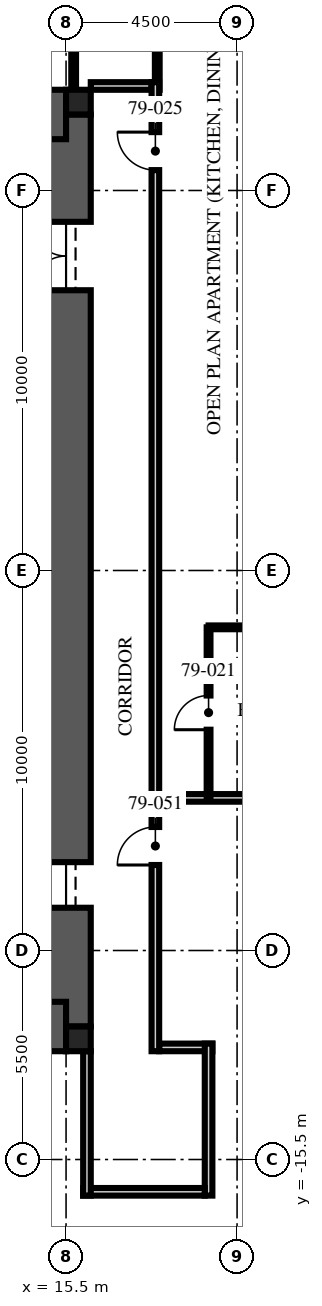
"""IFC4 building model, lengths in metres.
Left out: names, types, materials, properties, quantities, classifications, styles, units other than length and angle.
Written with IfcOpenShell. Run it as: python <this file> out.ifc"""

import sys

from ifc_helpers import new_model, si_unit, direction, frame, frame_2d, origin, origin_2d, place, context, subcontext, project, spatial, rectangle, extrude, element, fill, save


model = new_model("IFC4")
c1 = context("Model", 3, precision=1e-05, world=origin(), true_north=direction((0.0, 1.0)))
c2 = subcontext(c1, "Body", "Model", "MODEL_VIEW")
j1 = project(units=[si_unit("LENGTHUNIT", "METRE"), si_unit("PLANEANGLEUNIT", "RADIAN")], contexts=[c1])
p1 = place(None, origin())
s1 = spatial("IfcSite", under=j1, at=p1, CompositionType="ELEMENT")
p2 = place(p1, origin())
s2 = spatial("IfcBuilding", under=s1, at=p2, CompositionType="ELEMENT")
p3 = place(p2, frame((0.0, 0.0, 315.75)))
s3 = spatial("IfcBuildingStorey", under=s2, at=p3, CompositionType="ELEMENT", Elevation=315.75)
p4 = place(p3, frame((15.5, -12.0, -0.25), z_axis=(0.0, 0.0, 1.0), x_axis=(0.0, 1.0, 0.0)))
e1 = element("IfcWall", 1, at=p4, inside=s3, PredefinedType="SHEAR", context=c2, shape_type="SweptSolid", body=[
    extrude(rectangle(XDim=24.0, YDim=1.3, at=frame_2d((12.0, 0.0))), origin(), (0.0, 0.0, 1.0), 3.75),
])
p5 = place(p4, frame((3.125, 0.0, 0.25)))
e2 = element("IfcOpeningElement", 2, at=p5, cuts=e1, PredefinedType="OPENING", context=c2, shape_type="SweptSolid", body=[
    extrude(rectangle(XDim=1.2, YDim=2.1, at=frame_2d((0.6, 1.05))), frame((0.0, 0.66, 0.0), z_axis=(0.0, -1.0, 0.0), x_axis=(1.0, 0.0, 0.0)), (0.0, 0.0, 1.0), 1.32),
])
p6 = place(p4, frame((19.375, 0.0, 0.25)))
e3 = element("IfcOpeningElement", 3, at=p6, cuts=e1, PredefinedType="OPENING", context=c2, shape_type="SweptSolid", body=[
    extrude(rectangle(XDim=1.8, YDim=2.1, at=frame_2d((0.9, 1.05))), frame((0.0, 0.66, 0.0), z_axis=(0.0, -1.0, 0.0), x_axis=(1.0, 0.0, 0.0)), (0.0, 0.0, 1.0), 1.32),
])
for number, where, z_axis, x_axis in (
    (4, (-15.5, 12.0, -0.25), (0.0, 0.0, 1.0), (1.0, 0.0, 0.0)),
    (5, (-15.5, -12.0, -0.25), (0.0, 0.0, 1.0), (1.0, 0.0, 0.0)),
):
    element("IfcWall", number, at=place(p3, frame(where, z_axis=z_axis, x_axis=x_axis)), inside=s3, PredefinedType="SHEAR", context=c2, shape_type="SweptSolid", body=[
        extrude(rectangle(XDim=31.0, YDim=1.3, at=frame_2d((15.5, 0.0))), origin(), (0.0, 0.0, 1.0), 3.75),
    ])
for number, where, z_axis, x_axis in (
    (6, (15.825, 12.325, -0.25), (0.0, 0.0, 1.0), (1.0, 0.0, 0.0)),
    (7, (15.825, -12.325, -0.25), (0.0, 0.0, 1.0), (1.0, 0.0, 0.0)),
):
    element("IfcColumn", number, at=place(p3, frame(where, z_axis=z_axis, x_axis=x_axis)), inside=s3, PredefinedType="COLUMN", context=c2, shape_type="SweptSolid", body=[
        extrude(rectangle(XDim=0.65, YDim=0.65, at=origin_2d()), origin(), (0.0, 0.0, 1.0), 3.75),
    ])
p7 = place(p3, frame((17.95, -12.55, 0.0), z_axis=(0.0, 0.0, 1.0), x_axis=(1.0, 0.0, 0.0)))
e8 = element("IfcWall", 8, at=p7, inside=s3, PredefinedType="PARTITIONING", context=c2, shape_type="SweptSolid", body=[
    extrude(rectangle(XDim=1.4, YDim=0.2, at=frame_2d((0.7, 0.0))), origin(), (0.0, 0.0, 1.0), 3.5),
])
p8 = place(p3, frame((19.25, -12.45, 0.0), z_axis=(0.0, 0.0, 1.0), x_axis=(0.0, -1.0, 0.0)))
e9 = element("IfcWall", 9, at=p8, inside=s3, PredefinedType="PARTITIONING", context=c2, shape_type="SweptSolid", body=[
    extrude(rectangle(XDim=4.0, YDim=0.2, at=frame_2d((2.0, 0.0))), origin(), (0.0, 0.0, 1.0), 2.9),
])
p9 = place(p3, frame((19.15, -16.35, 0.0), z_axis=(0.0, 0.0, 1.0), x_axis=(-1.0, 0.0, 0.0)))
e10 = element("IfcWall", 10, at=p9, inside=s3, PredefinedType="PARTITIONING", context=c2, shape_type="SweptSolid", body=[
    extrude(rectangle(XDim=3.2, YDim=0.2, at=frame_2d((1.6, 0.0))), origin(), (0.0, 0.0, 1.0), 2.6),
])
p10 = place(p3, frame((16.05, -16.45, 0.0), z_axis=(0.0, 0.0, 1.0), x_axis=(0.0, 1.0, 0.0)))
e11 = element("IfcWall", 11, at=p10, inside=s3, PredefinedType="PARTITIONING", context=c2, shape_type="SweptSolid", body=[
    extrude(rectangle(XDim=3.8, YDim=0.2, at=frame_2d((1.9, 0.0))), origin(), (0.0, 0.0, 1.0), 2.6),
])
p11 = place(p3, frame((16.15, 12.75, 0.0), z_axis=(0.0, 0.0, 1.0), x_axis=(1.0, 0.0, 0.0)))
e12 = element("IfcWall", 12, at=p11, inside=s3, PredefinedType="PARTITIONING", context=c2, shape_type="SweptSolid", body=[
    extrude(rectangle(XDim=1.6, YDim=0.2, at=frame_2d((0.8, 0.0))), origin(), (0.0, 0.0, 1.0), 2.6),
])
p12 = place(p3, frame((17.95, -5.984, 0.0), z_axis=(0.0, 0.0, 1.0), x_axis=(1.0, 0.0, 0.0)))
e13 = element("IfcWall", 13, at=p12, inside=s3, PredefinedType="PARTITIONING", context=c2, shape_type="SweptSolid", body=[
    extrude(rectangle(XDim=5.3, YDim=0.2, at=frame_2d((2.65, 0.0))), origin(), (0.0, 0.0, 1.0), 3.01),
])
p13 = place(p3, frame((19.25, -1.496, 0.0), z_axis=(0.0, 0.0, 1.0), x_axis=(1.0, 0.0, 0.0)))
e14 = element("IfcWall", 14, at=p13, inside=s3, PredefinedType="PARTITIONING", context=c2, shape_type="SweptSolid", body=[
    extrude(rectangle(XDim=4.0, YDim=0.1, at=frame_2d((2.0, 0.0))), origin(), (0.0, 0.0, 1.0), 3.01),
])
p14 = place(p3, frame((19.25, -5.984, 0.0), z_axis=(0.0, 0.0, 1.0), x_axis=(0.0, 1.0, 0.0)))
e15 = element("IfcWall", 15, at=p14, inside=s3, PredefinedType="PARTITIONING", context=c2, shape_type="SweptSolid", body=[
    extrude(rectangle(XDim=4.488, YDim=0.1, at=frame_2d((2.244, 0.0))), origin(), (0.0, 0.0, 1.0), 2.91),
])
p15 = place(p14, frame((1.794, 0.0, 0.0)))
e16 = element("IfcOpeningElement", 16, at=p15, cuts=e15, PredefinedType="OPENING", context=c2, shape_type="SweptSolid", body=[
    extrude(rectangle(XDim=0.9, YDim=2.1, at=frame_2d((0.45, 1.05))), frame((0.0, 0.06, 0.0), z_axis=(0.0, -1.0, 0.0), x_axis=(1.0, 0.0, 0.0)), (0.0, 0.0, 1.0), 0.12),
])
for number, where, z_axis, x_axis in (
    (17, (17.9, 12.65, 0.0), (0.0, 0.0, 1.0), (0.0, 1.0, 0.0)),
    (18, (15.7, 12.65, 0.0), (0.0, 0.0, 1.0), (0.0, 1.0, 0.0)),
):
    element("IfcWall", number, at=place(p3, frame(where, z_axis=z_axis, x_axis=x_axis)), inside=s3, PredefinedType="PARTITIONING", context=c2, shape_type="SweptSolid", body=[
        extrude(rectangle(XDim=3.846, YDim=0.125, at=frame_2d((1.923, 0.0))), origin(), (0.0, 0.0, 1.0), 2.6),
    ])
p16 = place(p3, frame((17.85, -12.65, 0.0), z_axis=(0.0, 0.0, 1.0), x_axis=(0.0, 1.0, 0.0)))
e19 = element("IfcWall", 19, at=p16, inside=s3, PredefinedType="PARTITIONING", context=c2, shape_type="SweptSolid", body=[
    extrude(rectangle(XDim=25.5, YDim=0.2, at=frame_2d((12.75, 0.0))), origin(), (0.0, 0.0, 1.0), 2.9),
])
p17 = place(p16, frame((23.186, 0.0, 0.0)))
e20 = element("IfcOpeningElement", 20, at=p17, cuts=e19, PredefinedType="OPENING", context=c2, shape_type="SweptSolid", body=[
    extrude(rectangle(XDim=1.0, YDim=2.2, at=frame_2d((0.5, 1.1))), frame((0.0, 0.11, 0.0), z_axis=(0.0, -1.0, 0.0), x_axis=(1.0, 0.0, 0.0)), (0.0, 0.0, 1.0), 0.22),
])
p18 = place(p16, frame((4.9, 0.0, 0.0)))
e21 = element("IfcOpeningElement", 21, at=p18, cuts=e19, PredefinedType="OPENING", context=c2, shape_type="SweptSolid", body=[
    extrude(rectangle(XDim=1.0, YDim=2.2, at=frame_2d((0.5, 1.1))), frame((0.0, 0.11, 0.0), z_axis=(0.0, -1.0, 0.0), x_axis=(1.0, 0.0, 0.0)), (0.0, 0.0, 1.0), 0.22),
])
p19 = place(p5, origin())
e22 = element("IfcDoor", 22, at=p19, inside=s3, OperationType="SINGLE_SWING_LEFT", PredefinedType="DOOR", context=c2, shape_type="SweptSolid", body=[
    extrude(rectangle(XDim=1.2, YDim=2.1, at=frame_2d((0.6, 1.05))), frame((0.0, 0.025, 0.0), z_axis=(0.0, -1.0, 0.0), x_axis=(1.0, 0.0, 0.0)), (0.0, 0.0, 1.0), 0.05),
])
fill(e2, e22)
p20 = place(p6, origin())
e23 = element("IfcDoor", 23, at=p20, inside=s3, OperationType="DOUBLE_DOOR_SINGLE_SWING", PredefinedType="DOOR", context=c2, shape_type="SweptSolid", body=[
    extrude(rectangle(XDim=1.8, YDim=2.1, at=frame_2d((0.9, 1.05))), frame((0.0, 0.025, 0.0), z_axis=(0.0, -1.0, 0.0), x_axis=(1.0, 0.0, 0.0)), (0.0, 0.0, 1.0), 0.05),
])
fill(e3, e23)
p21 = place(p15, origin())
e24 = element("IfcDoor", 24, at=p21, inside=s3, OperationType="SINGLE_SWING_LEFT", PredefinedType="DOOR", context=c2, shape_type="SweptSolid", body=[
    extrude(rectangle(XDim=0.9, YDim=2.1, at=frame_2d((0.45, 1.05))), frame((0.0, 0.025, 0.0), z_axis=(0.0, -1.0, 0.0), x_axis=(1.0, 0.0, 0.0)), (0.0, 0.0, 1.0), 0.05),
])
fill(e16, e24)
p22 = place(p17, origin())
e25 = element("IfcDoor", 25, at=p22, inside=s3, OperationType="SINGLE_SWING_RIGHT", PredefinedType="DOOR", context=c2, shape_type="SweptSolid", body=[
    extrude(rectangle(XDim=1.0, YDim=2.2, at=frame_2d((0.5, 1.1))), frame((0.0, 0.025, 0.0), z_axis=(0.0, -1.0, 0.0), x_axis=(1.0, 0.0, 0.0)), (0.0, 0.0, 1.0), 0.05),
])
fill(e20, e25)
p23 = place(p18, origin())
e26 = element("IfcDoor", 26, at=p23, inside=s3, OperationType="SINGLE_SWING_LEFT", PredefinedType="DOOR", context=c2, shape_type="SweptSolid", body=[
    extrude(rectangle(XDim=1.0, YDim=2.2, at=frame_2d((0.5, 1.1))), frame((0.0, 0.025, 0.0), z_axis=(0.0, -1.0, 0.0), x_axis=(1.0, 0.0, 0.0)), (0.0, 0.0, 1.0), 0.05),
])
fill(e21, e26)
save(model, sys.argv[1])
